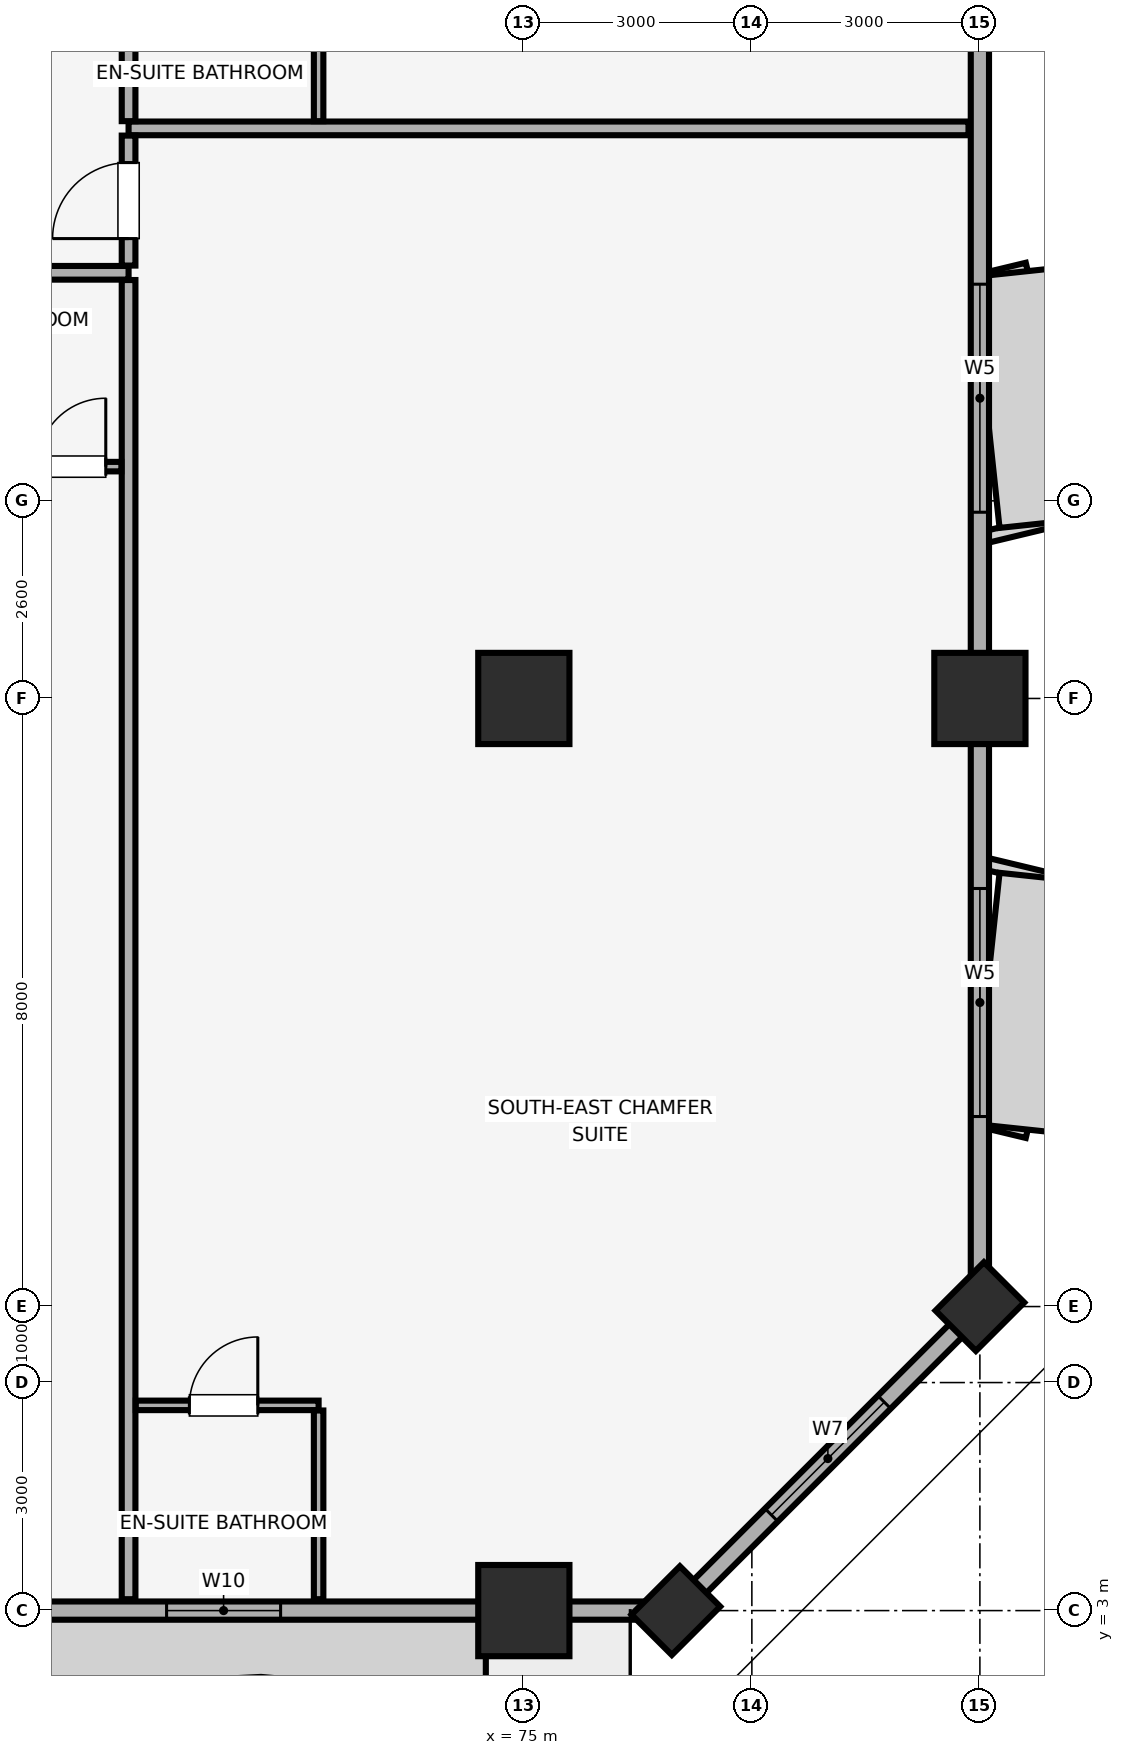
"""IFC4 building model, lengths in metres.
Left out: names, types, materials, properties, quantities, classifications, styles, units other than length and angle.
Written with IfcOpenShell. Run it as: python <this file> out.ifc"""

import sys

from ifc_helpers import new_model, si_unit, direction, frame, frame_2d, origin, origin_2d, place, context, subcontext, project, spatial, rectangle, extrude, element, fill, save


model = new_model("IFC4")
c1 = context("Model", 3, precision=1e-05, world=origin(), true_north=direction((0.0, 1.0)))
c2 = subcontext(c1, "Body", "Model", "MODEL_VIEW")
j1 = project(units=[si_unit("LENGTHUNIT", "METRE"), si_unit("PLANEANGLEUNIT", "RADIAN")], contexts=[c1])
p1 = place(None, origin())
s1 = spatial("IfcSite", under=j1, at=p1, CompositionType="ELEMENT")
p2 = place(p1, origin())
s2 = spatial("IfcBuilding", under=s1, at=p2, CompositionType="ELEMENT")
p3 = place(p2, frame((0.0, 0.0, 180.95)))
s3 = spatial("IfcBuildingStorey", under=s2, at=p3, CompositionType="ELEMENT", Elevation=180.95)
for number, where, z_axis, x_axis in (
    (1, (75.0, 3.0, 0.0), (0.0, 0.0, 1.0), (1.0, 0.0, 0.0)),
    (2, (81.0, 15.0, 0.0), (0.0, 0.0, 1.0), (1.0, 0.0, 0.0)),
):
    element("IfcColumn", number, at=place(p3, frame(where, z_axis=z_axis, x_axis=x_axis)), inside=s3, PredefinedType="COLUMN", context=c2, shape_type="SweptSolid", body=[
        extrude(rectangle(XDim=1.2, YDim=1.2, at=origin_2d()), origin(), (0.0, 0.0, 1.0), 3.45),
    ])
for number, where, z_axis, x_axis in (
    (3, (77.0, 3.0, 0.0), (0.0, 0.0, 1.0), (0.707, 0.707, 0.0)),
    (4, (81.0, 7.0, 0.0), (0.0, 0.0, 1.0), (0.707, 0.707, 0.0)),
):
    element("IfcColumn", number, at=place(p3, frame(where, z_axis=z_axis, x_axis=x_axis)), inside=s3, PredefinedType="PILASTER", context=c2, shape_type="SweptSolid", body=[
        extrude(rectangle(XDim=0.9, YDim=0.75, at=origin_2d()), origin(), (0.0, 0.0, 1.0), 3.45),
    ])
p4 = place(p3, frame((75.0, 15.0, 0.0), z_axis=(0.0, 0.0, 1.0), x_axis=(1.0, 0.0, 0.0)))
e5 = element("IfcColumn", 5, at=p4, inside=s3, PredefinedType="COLUMN", context=c2, shape_type="SweptSolid", body=[
    extrude(rectangle(XDim=1.2, YDim=1.2, at=origin_2d()), origin(), (0.0, 0.0, 1.0), 3.45),
])
p5 = place(p3, frame((7.0, 3.0, 0.0), z_axis=(0.0, 0.0, 1.0), x_axis=(1.0, 0.0, 0.0)))
e6 = element("IfcWall", 6, at=p5, inside=s3, PredefinedType="SOLIDWALL", context=c2, shape_type="SweptSolid", body=[
    extrude(rectangle(XDim=70.0, YDim=0.24, at=frame_2d((35.0, 0.0))), origin(), (0.0, 0.0, 1.0), 2.65),
])
p6 = place(p5, frame((11.383, 0.0, 0.0)))
e7 = element("IfcOpeningElement", 7, at=p6, cuts=e6, PredefinedType="OPENING", context=c2, shape_type="SweptSolid", body=[
    extrude(rectangle(XDim=1.1, YDim=2.15, at=frame_2d((0.55, 1.075))), frame((0.0, 0.13, 0.0), z_axis=(0.0, -1.0, 0.0), x_axis=(1.0, 0.0, 0.0)), (0.0, 0.0, 1.0), 0.26),
])
p7 = place(p5, frame((34.45, 0.0, 0.0)))
e8 = element("IfcOpeningElement", 8, at=p7, cuts=e6, PredefinedType="OPENING", context=c2, shape_type="SweptSolid", body=[
    extrude(rectangle(XDim=1.1, YDim=2.15, at=frame_2d((0.55, 1.075))), frame((0.0, 0.13, 0.0), z_axis=(0.0, -1.0, 0.0), x_axis=(1.0, 0.0, 0.0)), (0.0, 0.0, 1.0), 0.26),
])
p8 = place(p5, frame((57.517, 0.0, 0.0)))
e9 = element("IfcOpeningElement", 9, at=p8, cuts=e6, PredefinedType="OPENING", context=c2, shape_type="SweptSolid", body=[
    extrude(rectangle(XDim=1.1, YDim=2.15, at=frame_2d((0.55, 1.075))), frame((0.0, 0.13, 0.0), z_axis=(0.0, -1.0, 0.0), x_axis=(1.0, 0.0, 0.0)), (0.0, 0.0, 1.0), 0.26),
])
p9 = place(p5, frame((5.2, 0.0, 0.85)))
e10 = element("IfcOpeningElement", 10, at=p9, cuts=e6, PredefinedType="OPENING", context=c2, shape_type="SweptSolid", body=[
    extrude(rectangle(XDim=1.5, YDim=1.4, at=frame_2d((0.75, 0.7))), frame((0.0, 0.13, 0.0), z_axis=(0.0, -1.0, 0.0), x_axis=(1.0, 0.0, 0.0)), (0.0, 0.0, 1.0), 0.26),
])
p10 = place(p5, frame((13.133, 0.0, 0.85)))
e11 = element("IfcOpeningElement", 11, at=p10, cuts=e6, PredefinedType="OPENING", context=c2, shape_type="SweptSolid", body=[
    extrude(rectangle(XDim=1.5, YDim=1.4, at=frame_2d((0.75, 0.7))), frame((0.0, 0.13, 0.0), z_axis=(0.0, -1.0, 0.0), x_axis=(1.0, 0.0, 0.0)), (0.0, 0.0, 1.0), 0.26),
])
p11 = place(p5, frame((17.812, 0.0, 0.85)))
e12 = element("IfcOpeningElement", 12, at=p11, cuts=e6, PredefinedType="OPENING", context=c2, shape_type="SweptSolid", body=[
    extrude(rectangle(XDim=4.2, YDim=1.65, at=frame_2d((2.1, 0.825))), frame((0.0, 0.13, 0.0), z_axis=(0.0, -1.0, 0.0), x_axis=(1.0, 0.0, 0.0)), (0.0, 0.0, 1.0), 0.26),
])
p12 = place(p5, frame((25.1, 0.0, 0.85)))
e13 = element("IfcOpeningElement", 13, at=p12, cuts=e6, PredefinedType="OPENING", context=c2, shape_type="SweptSolid", body=[
    extrude(rectangle(XDim=4.2, YDim=1.65, at=frame_2d((2.1, 0.825))), frame((0.0, 0.13, 0.0), z_axis=(0.0, -1.0, 0.0), x_axis=(1.0, 0.0, 0.0)), (0.0, 0.0, 1.0), 0.26),
])
p13 = place(p5, frame((31.99, 0.0, 0.85)))
e14 = element("IfcOpeningElement", 14, at=p13, cuts=e6, PredefinedType="OPENING", context=c2, shape_type="SweptSolid", body=[
    extrude(rectangle(XDim=1.5, YDim=1.4, at=frame_2d((0.75, 0.7))), frame((0.0, 0.13, 0.0), z_axis=(0.0, -1.0, 0.0), x_axis=(1.0, 0.0, 0.0)), (0.0, 0.0, 1.0), 0.26),
])
p14 = place(p5, frame((36.51, 0.0, 0.85)))
e15 = element("IfcOpeningElement", 15, at=p14, cuts=e6, PredefinedType="OPENING", context=c2, shape_type="SweptSolid", body=[
    extrude(rectangle(XDim=1.5, YDim=1.4, at=frame_2d((0.75, 0.7))), frame((0.0, 0.13, 0.0), z_axis=(0.0, -1.0, 0.0), x_axis=(1.0, 0.0, 0.0)), (0.0, 0.0, 1.0), 0.26),
])
p15 = place(p5, frame((40.7, 0.0, 0.85)))
e16 = element("IfcOpeningElement", 16, at=p15, cuts=e6, PredefinedType="OPENING", context=c2, shape_type="SweptSolid", body=[
    extrude(rectangle(XDim=4.2, YDim=1.65, at=frame_2d((2.1, 0.825))), frame((0.0, 0.13, 0.0), z_axis=(0.0, -1.0, 0.0), x_axis=(1.0, 0.0, 0.0)), (0.0, 0.0, 1.0), 0.26),
])
p16 = place(p5, frame((47.9, 0.0, 0.85)))
e17 = element("IfcOpeningElement", 17, at=p16, cuts=e6, PredefinedType="OPENING", context=c2, shape_type="SweptSolid", body=[
    extrude(rectangle(XDim=4.2, YDim=1.65, at=frame_2d((2.1, 0.825))), frame((0.0, 0.13, 0.0), z_axis=(0.0, -1.0, 0.0), x_axis=(1.0, 0.0, 0.0)), (0.0, 0.0, 1.0), 0.26),
])
p17 = place(p5, frame((55.314, 0.0, 0.85)))
e18 = element("IfcOpeningElement", 18, at=p17, cuts=e6, PredefinedType="OPENING", context=c2, shape_type="SweptSolid", body=[
    extrude(rectangle(XDim=1.5, YDim=1.4, at=frame_2d((0.75, 0.7))), frame((0.0, 0.13, 0.0), z_axis=(0.0, -1.0, 0.0), x_axis=(1.0, 0.0, 0.0)), (0.0, 0.0, 1.0), 0.26),
])
p18 = place(p5, frame((63.3, 0.0, 0.85)))
e19 = element("IfcOpeningElement", 19, at=p18, cuts=e6, PredefinedType="OPENING", context=c2, shape_type="SweptSolid", body=[
    extrude(rectangle(XDim=1.5, YDim=1.4, at=frame_2d((0.75, 0.7))), frame((0.0, 0.13, 0.0), z_axis=(0.0, -1.0, 0.0), x_axis=(1.0, 0.0, 0.0)), (0.0, 0.0, 1.0), 0.26),
])
p19 = place(p3, frame((77.0, 3.0, 0.0), z_axis=(0.0, 0.0, 1.0), x_axis=(0.707106781187, 0.707106781187, 0.0)))
e20 = element("IfcWall", 20, at=p19, inside=s3, PredefinedType="SOLIDWALL", context=c2, shape_type="SweptSolid", body=[
    extrude(rectangle(XDim=5.657, YDim=0.24, at=frame_2d((2.828, 0.0))), origin(), (0.0, 0.0, 1.0), 2.65),
])
p20 = place(p19, frame((1.778, 0.0, 0.85)))
e21 = element("IfcOpeningElement", 21, at=p20, cuts=e20, PredefinedType="OPENING", context=c2, shape_type="SweptSolid", body=[
    extrude(rectangle(XDim=2.1, YDim=1.6, at=frame_2d((1.05, 0.8))), frame((0.0, 0.13, 0.0), z_axis=(0.0, -1.0, 0.0), x_axis=(1.0, 0.0, 0.0)), (0.0, 0.0, 1.0), 0.26),
])
p21 = place(p3, frame((81.0, 7.0, 0.0), z_axis=(0.0, 0.0, 1.0), x_axis=(0.0, 1.0, 0.0)))
e22 = element("IfcWall", 22, at=p21, inside=s3, PredefinedType="SOLIDWALL", context=c2, shape_type="SweptSolid", body=[
    extrude(rectangle(XDim=38.0, YDim=0.24, at=frame_2d((19.0, 0.0))), origin(), (0.0, 0.0, 1.0), 2.65),
])
p22 = place(p21, frame((2.5, 0.0, 0.85)))
e23 = element("IfcOpeningElement", 23, at=p22, cuts=e22, PredefinedType="OPENING", context=c2, shape_type="SweptSolid", body=[
    extrude(rectangle(XDim=3.0, YDim=1.5, at=frame_2d((1.5, 0.75))), frame((0.0, 0.13, 0.0), z_axis=(0.0, -1.0, 0.0), x_axis=(1.0, 0.0, 0.0)), (0.0, 0.0, 1.0), 0.26),
])
p23 = place(p21, frame((10.45, 0.0, 0.85)))
e24 = element("IfcOpeningElement", 24, at=p23, cuts=e22, PredefinedType="OPENING", context=c2, shape_type="SweptSolid", body=[
    extrude(rectangle(XDim=3.0, YDim=1.5, at=frame_2d((1.5, 0.75))), frame((0.0, 0.13, 0.0), z_axis=(0.0, -1.0, 0.0), x_axis=(1.0, 0.0, 0.0)), (0.0, 0.0, 1.0), 0.26),
])
p24 = place(p21, frame((17.25, 0.0, 0.85)))
e25 = element("IfcOpeningElement", 25, at=p24, cuts=e22, PredefinedType="OPENING", context=c2, shape_type="SweptSolid", body=[
    extrude(rectangle(XDim=3.0, YDim=1.5, at=frame_2d((1.5, 0.75))), frame((0.0, 0.13, 0.0), z_axis=(0.0, -1.0, 0.0), x_axis=(1.0, 0.0, 0.0)), (0.0, 0.0, 1.0), 0.26),
])
p25 = place(p21, frame((23.615, 0.0, 0.85)))
e26 = element("IfcOpeningElement", 26, at=p25, cuts=e22, PredefinedType="OPENING", context=c2, shape_type="SweptSolid", body=[
    extrude(rectangle(XDim=3.0, YDim=1.5, at=frame_2d((1.5, 0.75))), frame((0.0, 0.13, 0.0), z_axis=(0.0, -1.0, 0.0), x_axis=(1.0, 0.0, 0.0)), (0.0, 0.0, 1.0), 0.26),
])
p26 = place(p21, frame((28.385, 0.0, 0.85)))
e27 = element("IfcOpeningElement", 27, at=p26, cuts=e22, PredefinedType="OPENING", context=c2, shape_type="SweptSolid", body=[
    extrude(rectangle(XDim=3.0, YDim=1.5, at=frame_2d((1.5, 0.75))), frame((0.0, 0.13, 0.0), z_axis=(0.0, -1.0, 0.0), x_axis=(1.0, 0.0, 0.0)), (0.0, 0.0, 1.0), 0.26),
])
p27 = place(p21, frame((33.915, 0.0, 0.85)))
e28 = element("IfcOpeningElement", 28, at=p27, cuts=e22, PredefinedType="OPENING", context=c2, shape_type="SweptSolid", body=[
    extrude(rectangle(XDim=3.0, YDim=1.5, at=frame_2d((1.5, 0.75))), frame((0.0, 0.13, 0.0), z_axis=(0.0, -1.0, 0.0), x_axis=(1.0, 0.0, 0.0)), (0.0, 0.0, 1.0), 0.26),
])
p28 = place(p3, frame((61.876, 20.6, 0.0), z_axis=(0.0, 0.0, 1.0), x_axis=(1.0, 0.0, 0.0)))
e29 = element("IfcWall", 29, at=p28, inside=s3, PredefinedType="PARTITIONING", context=c2, shape_type="SweptSolid", body=[
    extrude(rectangle(XDim=7.924, YDim=0.18, at=frame_2d((3.962, 0.0))), origin(), (0.0, 0.0, 1.0), 3.45),
])
p29 = place(p28, frame((1.715, 0.0, 0.0)))
e30 = element("IfcOpeningElement", 30, at=p29, cuts=e29, PredefinedType="OPENING", context=c2, shape_type="SweptSolid", body=[
    extrude(rectangle(XDim=1.0, YDim=2.15, at=frame_2d((0.5, 1.075))), frame((0.0, 0.1, 0.0), z_axis=(0.0, -1.0, 0.0), x_axis=(1.0, 0.0, 0.0)), (0.0, 0.0, 1.0), 0.2),
])
p30 = place(p3, frame((69.8, 3.15, 0.0), z_axis=(0.0, 0.0, 1.0), x_axis=(0.0, 1.0, 0.0)))
e31 = element("IfcWall", 31, at=p30, inside=s3, PredefinedType="PARTITIONING", context=c2, shape_type="SweptSolid", body=[
    extrude(rectangle(XDim=17.355, YDim=0.18, at=frame_2d((8.677, 0.0))), origin(), (0.0, 0.0, 1.0), 3.45),
])
p31 = place(p3, frame((67.3, 18.05, 0.0), z_axis=(0.0, 0.0, 1.0), x_axis=(1.0, 0.0, 0.0)))
e32 = element("IfcWall", 32, at=p31, inside=s3, PredefinedType="PARTITIONING", context=c2, shape_type="SweptSolid", body=[
    extrude(rectangle(XDim=2.405, YDim=0.125, at=frame_2d((1.203, 0.0))), origin(), (0.0, 0.0, 1.0), 3.45),
])
p32 = place(p31, frame((1.3, 0.0, 0.0)))
e33 = element("IfcOpeningElement", 33, at=p32, cuts=e32, PredefinedType="OPENING", context=c2, shape_type="SweptSolid", body=[
    extrude(rectangle(XDim=0.9, YDim=2.1, at=frame_2d((0.45, 1.05))), frame((0.0, 0.073, 0.0), z_axis=(0.0, -1.0, 0.0), x_axis=(1.0, 0.0, 0.0)), (0.0, 0.0, 1.0), 0.145),
])
p33 = place(p3, frame((69.8, 22.5, 0.0), z_axis=(0.0, 0.0, 1.0), x_axis=(1.0, 0.0, 0.0)))
e34 = element("IfcWall", 34, at=p33, inside=s3, PredefinedType="PARTITIONING", context=c2, shape_type="SweptSolid", body=[
    extrude(rectangle(XDim=11.05, YDim=0.18, at=frame_2d((5.525, 0.0))), origin(), (0.0, 0.0, 1.0), 3.45),
])
p34 = place(p3, frame((69.8, 20.695, 0.0), z_axis=(0.0, 0.0, 1.0), x_axis=(0.0, 1.0, 0.0)))
e35 = element("IfcWall", 35, at=p34, inside=s3, PredefinedType="PARTITIONING", context=c2, shape_type="SweptSolid", body=[
    extrude(rectangle(XDim=1.71, YDim=0.18, at=frame_2d((0.855, 0.0))), origin(), (0.0, 0.0, 1.0), 3.45),
])
p35 = place(p34, frame((0.355, 0.0, 0.0)))
e36 = element("IfcOpeningElement", 36, at=p35, cuts=e35, PredefinedType="OPENING", context=c2, shape_type="SweptSolid", body=[
    extrude(rectangle(XDim=1.0, YDim=2.15, at=frame_2d((0.5, 1.075))), frame((0.0, 0.1, 0.0), z_axis=(0.0, -1.0, 0.0), x_axis=(1.0, 0.0, 0.0)), (0.0, 0.0, 1.0), 0.2),
])
p36 = place(p3, frame((69.895, 5.7, 0.0), z_axis=(0.0, 0.0, 1.0), x_axis=(1.0, 0.0, 0.0)))
e37 = element("IfcWall", 37, at=p36, inside=s3, PredefinedType="PARTITIONING", context=c2, shape_type="SweptSolid", body=[
    extrude(rectangle(XDim=2.405, YDim=0.125, at=frame_2d((1.203, 0.0))), origin(), (0.0, 0.0, 1.0), 3.45),
])
p37 = place(p36, frame((0.705, 0.0, 0.0)))
e38 = element("IfcOpeningElement", 38, at=p37, cuts=e37, PredefinedType="OPENING", context=c2, shape_type="SweptSolid", body=[
    extrude(rectangle(XDim=0.9, YDim=2.1, at=frame_2d((0.45, 1.05))), frame((0.0, 0.073, 0.0), z_axis=(0.0, -1.0, 0.0), x_axis=(1.0, 0.0, 0.0)), (0.0, 0.0, 1.0), 0.145),
])
p38 = place(p3, frame((72.3, 3.15, 0.0), z_axis=(0.0, 0.0, 1.0), x_axis=(0.0, 1.0, 0.0)))
e39 = element("IfcWall", 39, at=p38, inside=s3, PredefinedType="PARTITIONING", context=c2, shape_type="SweptSolid", body=[
    extrude(rectangle(XDim=2.483, YDim=0.125, at=frame_2d((1.241, 0.0))), origin(), (0.0, 0.0, 1.0), 3.45),
])
p39 = place(p3, frame((69.8, 22.595, 0.0), z_axis=(0.0, 0.0, 1.0), x_axis=(0.0, 1.0, 0.0)))
e40 = element("IfcWall", 40, at=p39, inside=s3, PredefinedType="PARTITIONING", context=c2, shape_type="SweptSolid", body=[
    extrude(rectangle(XDim=6.71, YDim=0.18, at=frame_2d((3.355, 0.0))), origin(), (0.0, 0.0, 1.0), 3.45),
])
p40 = place(p39, frame((3.94, 0.0, 0.0)))
e41 = element("IfcOpeningElement", 41, at=p40, cuts=e40, PredefinedType="OPENING", context=c2, shape_type="SweptSolid", body=[
    extrude(rectangle(XDim=1.0, YDim=2.15, at=frame_2d((0.5, 1.075))), frame((0.0, 0.1, 0.0), z_axis=(0.0, -1.0, 0.0), x_axis=(1.0, 0.0, 0.0)), (0.0, 0.0, 1.0), 0.2),
])
p41 = place(p3, frame((72.3, 22.595, 0.0), z_axis=(0.0, 0.0, 1.0), x_axis=(0.0, 1.0, 0.0)))
e42 = element("IfcWall", 42, at=p41, inside=s3, PredefinedType="PARTITIONING", context=c2, shape_type="SweptSolid", body=[
    extrude(rectangle(XDim=1.887, YDim=0.125, at=frame_2d((0.944, 0.0))), origin(), (0.0, 0.0, 1.0), 3.45),
])
p42 = place(p20, origin())
e43 = element("IfcWindow", 43, at=p42, inside=s3, PartitioningType="SINGLE_PANEL", PredefinedType="WINDOW", context=c2, shape_type="SweptSolid", body=[
    extrude(rectangle(XDim=2.1, YDim=1.6, at=frame_2d((1.05, 0.8))), frame((0.0, 0.03, 0.0), z_axis=(0.0, -1.0, 0.0), x_axis=(1.0, 0.0, 0.0)), (0.0, 0.0, 1.0), 0.06),
])
fill(e21, e43)
p43 = place(p18, origin())
e44 = element("IfcWindow", 44, at=p43, inside=s3, PartitioningType="SINGLE_PANEL", PredefinedType="WINDOW", context=c2, shape_type="SweptSolid", body=[
    extrude(rectangle(XDim=1.5, YDim=1.4, at=frame_2d((0.75, 0.7))), frame((0.0, 0.03, 0.0), z_axis=(0.0, -1.0, 0.0), x_axis=(1.0, 0.0, 0.0)), (0.0, 0.0, 1.0), 0.06),
])
fill(e19, e44)
p44 = place(p22, origin())
e45 = element("IfcWindow", 45, at=p44, inside=s3, PartitioningType="SINGLE_PANEL", PredefinedType="WINDOW", context=c2, shape_type="SweptSolid", body=[
    extrude(rectangle(XDim=3.0, YDim=1.5, at=frame_2d((1.5, 0.75))), frame((0.0, 0.03, 0.0), z_axis=(0.0, -1.0, 0.0), x_axis=(1.0, 0.0, 0.0)), (0.0, 0.0, 1.0), 0.06),
])
fill(e23, e45)
p45 = place(p23, origin())
e46 = element("IfcWindow", 46, at=p45, inside=s3, PartitioningType="SINGLE_PANEL", PredefinedType="WINDOW", context=c2, shape_type="SweptSolid", body=[
    extrude(rectangle(XDim=3.0, YDim=1.5, at=frame_2d((1.5, 0.75))), frame((0.0, 0.03, 0.0), z_axis=(0.0, -1.0, 0.0), x_axis=(1.0, 0.0, 0.0)), (0.0, 0.0, 1.0), 0.06),
])
fill(e24, e46)
p46 = place(p32, origin())
e47 = element("IfcDoor", 47, at=p46, inside=s3, OperationType="SINGLE_SWING_RIGHT", PredefinedType="DOOR", context=c2, shape_type="SweptSolid", body=[
    extrude(rectangle(XDim=0.9, YDim=2.1, at=frame_2d((0.45, 1.05))), frame((0.0, 0.025, 0.0), z_axis=(0.0, -1.0, 0.0), x_axis=(1.0, 0.0, 0.0)), (0.0, 0.0, 1.0), 0.05),
])
fill(e33, e47)
p47 = place(p35, origin())
e48 = element("IfcDoor", 48, at=p47, inside=s3, OperationType="SINGLE_SWING_LEFT", PredefinedType="DOOR", context=c2, shape_type="SweptSolid", body=[
    extrude(rectangle(XDim=1.0, YDim=2.15, at=frame_2d((0.5, 1.075))), frame((0.0, 0.025, 0.0), z_axis=(0.0, -1.0, 0.0), x_axis=(1.0, 0.0, 0.0)), (0.0, 0.0, 1.0), 0.05),
])
fill(e36, e48)
p48 = place(p37, origin())
e49 = element("IfcDoor", 49, at=p48, inside=s3, OperationType="SINGLE_SWING_RIGHT", PredefinedType="DOOR", context=c2, shape_type="SweptSolid", body=[
    extrude(rectangle(XDim=0.9, YDim=2.1, at=frame_2d((0.45, 1.05))), frame((0.0, 0.025, 0.0), z_axis=(0.0, -1.0, 0.0), x_axis=(1.0, 0.0, 0.0)), (0.0, 0.0, 1.0), 0.05),
])
fill(e38, e49)
save(model, sys.argv[1])
